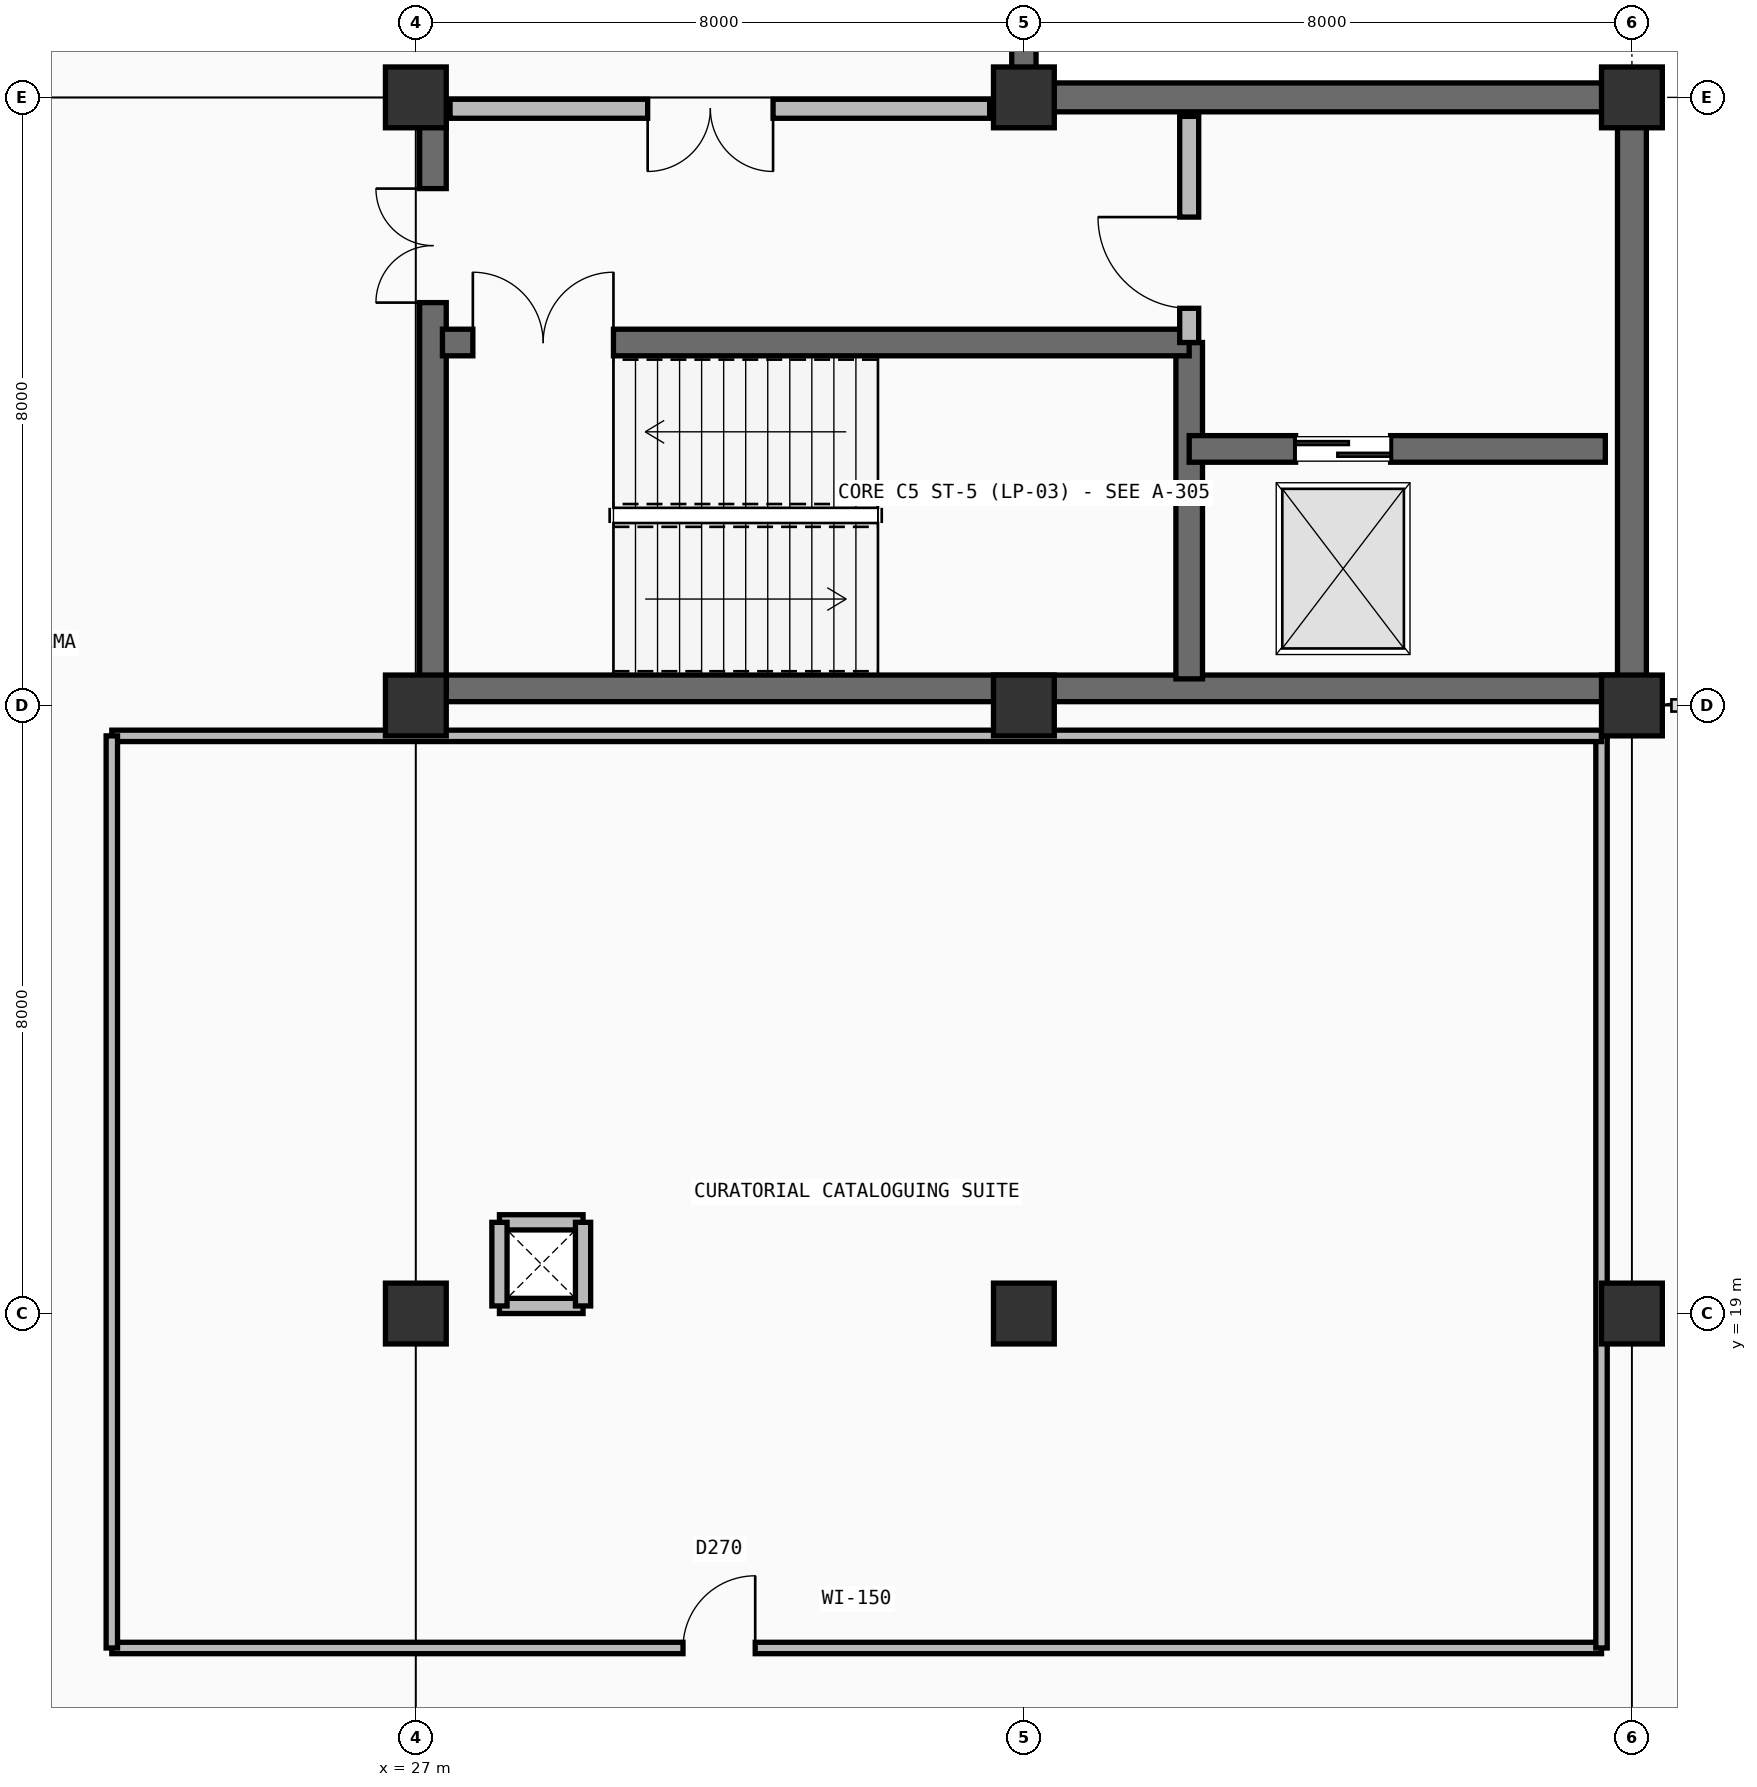
"""IFC4 building model, lengths in metres.
Left out: names, types, materials, properties, quantities, classifications, styles, units other than length and angle.
Written with IfcOpenShell. Run it as: python <this file> out.ifc"""

import sys

from ifc_helpers import new_model, si_unit, direction, frame, frame_2d, origin, origin_2d, place, context, subcontext, project, spatial, rectangle, extrude, element, fill, save


model = new_model("IFC4")
c1 = context("Model", 3, precision=1e-05, world=origin(), true_north=direction((0.0, 1.0)))
c2 = subcontext(c1, "Body", "Model", "MODEL_VIEW")
j1 = project(units=[si_unit("LENGTHUNIT", "METRE"), si_unit("PLANEANGLEUNIT", "RADIAN")], contexts=[c1])
p1 = place(None, origin())
s1 = spatial("IfcSite", under=j1, at=p1, CompositionType="ELEMENT")
p2 = place(p1, origin())
s2 = spatial("IfcBuilding", under=s1, at=p2, CompositionType="ELEMENT")
p3 = place(p2, frame((0.0, 0.0, 9.9)))
s3 = spatial("IfcBuildingStorey", under=s2, at=p3, CompositionType="ELEMENT", Elevation=9.9)
for number, where, z_axis, x_axis in (
    (1, (27.0, 19.0, 0.0), (0.0, 0.0, 1.0), (1.0, 0.0, 0.0)),
    (2, (27.0, 27.0, 0.0), (0.0, 0.0, 1.0), (1.0, 0.0, 0.0)),
    (3, (27.0, 35.0, 0.0), (0.0, 0.0, 1.0), (1.0, 0.0, 0.0)),
    (4, (35.0, 19.0, 0.0), (0.0, 0.0, 1.0), (1.0, 0.0, 0.0)),
    (5, (35.0, 27.0, 0.0), (0.0, 0.0, 1.0), (1.0, 0.0, 0.0)),
    (6, (35.0, 35.0, 0.0), (0.0, 0.0, 1.0), (1.0, 0.0, 0.0)),
    (7, (43.0, 19.0, 0.0), (0.0, 0.0, 1.0), (1.0, 0.0, 0.0)),
    (8, (43.0, 27.0, 0.0), (0.0, 0.0, 1.0), (1.0, 0.0, 0.0)),
    (9, (43.0, 35.0, 0.0), (0.0, 0.0, 1.0), (1.0, 0.0, 0.0)),
):
    element("IfcColumn", number, at=place(p3, frame(where, z_axis=z_axis, x_axis=x_axis)), inside=s3, PredefinedType="COLUMN", context=c2, shape_type="SweptSolid", body=[
        extrude(rectangle(XDim=0.8, YDim=0.8, at=origin_2d()), origin(), (0.0, 0.0, 1.0), 4.5),
    ])
p4 = place(p3, frame((35.0, 43.0, 0.0), z_axis=(0.0, 0.0, 1.0), x_axis=(0.0, -1.0, 0.0)))
e10 = element("IfcWall", 10, at=p4, inside=s3, PredefinedType="SOLIDWALL", context=c2, shape_type="SweptSolid", body=[
    extrude(rectangle(XDim=8.0, YDim=0.32, at=frame_2d((4.0, 0.0))), origin(), (0.0, 0.0, 1.0), 4.5),
])
p5 = place(p4, frame((2.95, 0.0, 1.1)))
e11 = element("IfcOpeningElement", 11, at=p5, cuts=e10, PredefinedType="OPENING", context=c2, shape_type="SweptSolid", body=[
    extrude(rectangle(XDim=2.1, YDim=0.95, at=frame_2d((1.05, 0.475))), frame((0.0, 0.17, 0.0), z_axis=(0.0, -1.0, 0.0), x_axis=(1.0, 0.0, 0.0)), (0.0, 0.0, 1.0), 0.34),
])
for number, where, z_axis, x_axis in (
    (12, (35.0, 35.0, 0.0), (0.0, 0.0, 1.0), (1.0, 0.0, 0.0)),
    (13, (43.0, 35.0, 0.0), (0.0, 0.0, 1.0), (0.0, -1.0, 0.0)),
):
    element("IfcWall", number, at=place(p3, frame(where, z_axis=z_axis, x_axis=x_axis)), inside=s3, PredefinedType="SOLIDWALL", context=c2, shape_type="SweptSolid", body=[
        extrude(rectangle(XDim=8.0, YDim=0.38, at=frame_2d((4.0, 0.0))), origin(), (0.0, 0.0, 1.0), 4.5),
    ])
p6 = place(p3, frame((27.2, 27.225, 0.0), z_axis=(0.0, 0.0, 1.0), x_axis=(1.0, 0.0, 0.0)))
e14 = element("IfcWall", 14, at=p6, inside=s3, PredefinedType="SHEAR", context=c2, shape_type="SweptSolid", body=[
    extrude(rectangle(XDim=15.6, YDim=0.35, at=frame_2d((7.8, 0.0))), origin(), (0.0, 0.0, 1.0), 4.2),
])
p7 = place(p3, frame((27.225, 27.2, 0.0), z_axis=(0.0, 0.0, 1.0), x_axis=(0.0, 1.0, 0.0)))
e15 = element("IfcWall", 15, at=p7, inside=s3, PredefinedType="SHEAR", context=c2, shape_type="SweptSolid", body=[
    extrude(rectangle(XDim=7.6, YDim=0.35, at=frame_2d((3.8, 0.0))), origin(), (0.0, 0.0, 1.0), 4.2),
])
p8 = place(p7, frame((5.1, 0.0, 0.0)))
e16 = element("IfcOpeningElement", 16, at=p8, cuts=e15, PredefinedType="OPENING", context=c2, shape_type="SweptSolid", body=[
    extrude(rectangle(XDim=1.5, YDim=2.2, at=frame_2d((0.75, 1.1))), frame((0.0, 0.185, 0.0), z_axis=(0.0, -1.0, 0.0), x_axis=(1.0, 0.0, 0.0)), (0.0, 0.0, 1.0), 0.37),
])
p9 = place(p3, frame((37.175, 27.35, 0.0), z_axis=(0.0, 0.0, 1.0), x_axis=(0.0, 1.0, 0.0)))
e17 = element("IfcWall", 17, at=p9, inside=s3, PredefinedType="SHEAR", context=c2, shape_type="SweptSolid", body=[
    extrude(rectangle(XDim=4.425, YDim=0.35, at=frame_2d((2.212, 0.0))), origin(), (0.0, 0.0, 1.0), 4.2),
])
p10 = place(p3, frame((27.35, 31.775, 0.0), z_axis=(0.0, 0.0, 1.0), x_axis=(1.0, 0.0, 0.0)))
e18 = element("IfcWall", 18, at=p10, inside=s3, PredefinedType="SHEAR", context=c2, shape_type="SweptSolid", body=[
    extrude(rectangle(XDim=9.825, YDim=0.35, at=frame_2d((4.913, 0.0))), origin(), (0.0, 0.0, 1.0), 4.2),
])
p11 = place(p10, frame((0.4, 0.0, 0.0)))
e19 = element("IfcOpeningElement", 19, at=p11, cuts=e18, PredefinedType="OPENING", context=c2, shape_type="SweptSolid", body=[
    extrude(rectangle(XDim=1.85, YDim=2.25, at=frame_2d((0.925, 1.125))), frame((0.0, 0.185, 0.0), z_axis=(0.0, -1.0, 0.0), x_axis=(1.0, 0.0, 0.0)), (0.0, 0.0, 1.0), 0.37),
])
p12 = place(p3, frame((37.175, 30.375, 0.0), z_axis=(0.0, 0.0, 1.0), x_axis=(1.0, 0.0, 0.0)))
e20 = element("IfcWall", 20, at=p12, inside=s3, PredefinedType="SHEAR", context=c2, shape_type="SweptSolid", body=[
    extrude(rectangle(XDim=5.475, YDim=0.35, at=frame_2d((2.737, 0.0))), origin(), (0.0, 0.0, 1.0), 4.2),
])
p13 = place(p12, frame((1.4, 0.0, 0.0)))
e21 = element("IfcOpeningElement", 21, at=p13, cuts=e20, PredefinedType="OPENING", context=c2, shape_type="SweptSolid", body=[
    extrude(rectangle(XDim=1.25, YDim=2.25, at=frame_2d((0.625, 1.125))), frame((0.0, 0.185, 0.0), z_axis=(0.0, -1.0, 0.0), x_axis=(1.0, 0.0, 0.0)), (0.0, 0.0, 1.0), 0.37),
])
p14 = place(p3, frame((37.175, 31.775, 0.0), z_axis=(0.0, 0.0, 1.0), x_axis=(0.0, 1.0, 0.0)))
e22 = element("IfcWall", 22, at=p14, inside=s3, PredefinedType="PARTITIONING", context=c2, shape_type="SweptSolid", body=[
    extrude(rectangle(XDim=2.975, YDim=0.25, at=frame_2d((1.488, 0.0))), origin(), (0.0, 0.0, 1.0), 4.2),
])
p15 = place(p14, frame((0.45, 0.0, 0.0)))
e23 = element("IfcOpeningElement", 23, at=p15, cuts=e22, PredefinedType="OPENING", context=c2, shape_type="SweptSolid", body=[
    extrude(rectangle(XDim=1.2, YDim=2.2, at=frame_2d((0.6, 1.1))), frame((0.0, 0.135, 0.0), z_axis=(0.0, -1.0, 0.0), x_axis=(1.0, 0.0, 0.0)), (0.0, 0.0, 1.0), 0.27),
])
p16 = place(p3, frame((27.45, 34.85, 0.0), z_axis=(0.0, 0.0, 1.0), x_axis=(1.0, 0.0, 0.0)))
e24 = element("IfcWall", 24, at=p16, inside=s3, PredefinedType="PARTITIONING", context=c2, shape_type="SweptSolid", body=[
    extrude(rectangle(XDim=7.1, YDim=0.25, at=frame_2d((3.55, 0.0))), origin(), (0.0, 0.0, 1.0), 3.535),
])
p17 = place(p16, frame((2.6, 0.0, 0.0)))
e25 = element("IfcOpeningElement", 25, at=p17, cuts=e24, PredefinedType="OPENING", context=c2, shape_type="SweptSolid", body=[
    extrude(rectangle(XDim=1.65, YDim=2.25, at=frame_2d((0.825, 1.125))), frame((0.0, 0.135, 0.0), z_axis=(0.0, -1.0, 0.0), x_axis=(1.0, 0.0, 0.0)), (0.0, 0.0, 1.0), 0.27),
])
p18 = place(p3, frame((23.0, 14.6, 0.0), z_axis=(0.0, 0.0, 1.0), x_axis=(1.0, 0.0, 0.0)))
e26 = element("IfcWall", 26, at=p18, inside=s3, PredefinedType="PARTITIONING", context=c2, shape_type="SweptSolid", body=[
    extrude(rectangle(XDim=19.6, YDim=0.15, at=frame_2d((9.8, 0.0))), origin(), (0.0, 0.0, 1.0), 4.2),
])
p19 = place(p18, frame((7.515, 0.0, 0.0)))
e27 = element("IfcOpeningElement", 27, at=p19, cuts=e26, PredefinedType="OPENING", context=c2, shape_type="SweptSolid", body=[
    extrude(rectangle(XDim=0.95, YDim=2.12, at=frame_2d((0.475, 1.06))), frame((0.0, 0.085, 0.0), z_axis=(0.0, -1.0, 0.0), x_axis=(1.0, 0.0, 0.0)), (0.0, 0.0, 1.0), 0.17),
])
p20 = place(p3, frame((42.6, 14.6, 0.0), z_axis=(0.0, 0.0, 1.0), x_axis=(0.0, 1.0, 0.0)))
e28 = element("IfcWall", 28, at=p20, inside=s3, PredefinedType="PARTITIONING", context=c2, shape_type="SweptSolid", body=[
    extrude(rectangle(XDim=12.0, YDim=0.15, at=frame_2d((6.0, 0.0))), origin(), (0.0, 0.0, 1.0), 3.585),
])
p21 = place(p3, frame((23.0, 26.6, 0.0), z_axis=(0.0, 0.0, 1.0), x_axis=(1.0, 0.0, 0.0)))
e29 = element("IfcWall", 29, at=p21, inside=s3, PredefinedType="PARTITIONING", context=c2, shape_type="SweptSolid", body=[
    extrude(rectangle(XDim=19.6, YDim=0.15, at=frame_2d((9.8, 0.0))), origin(), (0.0, 0.0, 1.0), 3.535),
])
p22 = place(p3, frame((23.0, 14.6, 0.0), z_axis=(0.0, 0.0, 1.0), x_axis=(0.0, 1.0, 0.0)))
e30 = element("IfcWall", 30, at=p22, inside=s3, PredefinedType="PARTITIONING", context=c2, shape_type="SweptSolid", body=[
    extrude(rectangle(XDim=12.0, YDim=0.15, at=frame_2d((6.0, 0.0))), origin(), (0.0, 0.0, 1.0), 3.635),
])
p23 = place(p3, frame((28.1, 19.1, 0.0), z_axis=(0.0, 0.0, 1.0), x_axis=(1.0, 0.0, 0.0)))
e31 = element("IfcWall", 31, at=p23, inside=s3, PredefinedType="PARTITIONING", context=c2, shape_type="SweptSolid", body=[
    extrude(rectangle(XDim=1.1, YDim=0.2, at=frame_2d((0.55, 0.0))), origin(), (0.0, 0.0, 1.0), 3.535),
])
for number, where, z_axis, x_axis in (
    (32, (28.1, 20.2, 0.0), (0.0, 0.0, 1.0), (1.0, 0.0, 0.0)),
    (33, (28.1, 19.1, 0.0), (0.0, 0.0, 1.0), (0.0, 1.0, 0.0)),
    (34, (29.2, 19.1, 0.0), (0.0, 0.0, 1.0), (0.0, 1.0, 0.0)),
):
    element("IfcWall", number, at=place(p3, frame(where, z_axis=z_axis, x_axis=x_axis)), inside=s3, PredefinedType="PARTITIONING", context=c2, shape_type="SweptSolid", body=[
        extrude(rectangle(XDim=1.1, YDim=0.2, at=frame_2d((0.55, 0.0))), origin(), (0.0, 0.0, 1.0), 4.2),
    ])
p24 = place(p11, origin())
e35 = element("IfcDoor", 35, at=p24, inside=s3, OperationType="DOUBLE_DOOR_SINGLE_SWING", PredefinedType="DOOR", context=c2, shape_type="SweptSolid", body=[
    extrude(rectangle(XDim=1.85, YDim=2.25, at=frame_2d((0.925, 1.125))), frame((0.0, 0.025, 0.0), z_axis=(0.0, -1.0, 0.0), x_axis=(1.0, 0.0, 0.0)), (0.0, 0.0, 1.0), 0.05),
])
fill(e19, e35)
p25 = place(p13, origin())
e36 = element("IfcDoor", 36, at=p25, inside=s3, OperationType="DOUBLE_DOOR_SLIDING", PredefinedType="DOOR", context=c2, shape_type="SweptSolid", body=[
    extrude(rectangle(XDim=1.25, YDim=2.25, at=frame_2d((0.625, 1.125))), frame((0.0, 0.025, 0.0), z_axis=(0.0, -1.0, 0.0), x_axis=(1.0, 0.0, 0.0)), (0.0, 0.0, 1.0), 0.05),
])
fill(e21, e36)
p26 = place(p15, origin())
e37 = element("IfcDoor", 37, at=p26, inside=s3, OperationType="SINGLE_SWING_RIGHT", PredefinedType="DOOR", context=c2, shape_type="SweptSolid", body=[
    extrude(rectangle(XDim=1.2, YDim=2.2, at=frame_2d((0.6, 1.1))), frame((0.0, 0.025, 0.0), z_axis=(0.0, -1.0, 0.0), x_axis=(1.0, 0.0, 0.0)), (0.0, 0.0, 1.0), 0.05),
])
fill(e23, e37)
p27 = place(p17, frame((1.65, 0.0, 0.0), z_axis=(0.0, 0.0, 1.0), x_axis=(-1.0, 0.0, 0.0)))
e38 = element("IfcDoor", 38, at=p27, inside=s3, OperationType="DOUBLE_DOOR_SINGLE_SWING", PredefinedType="DOOR", context=c2, shape_type="SweptSolid", body=[
    extrude(rectangle(XDim=1.65, YDim=2.25, at=frame_2d((0.825, 1.125))), frame((0.0, 0.025, 0.0), z_axis=(0.0, -1.0, 0.0), x_axis=(1.0, 0.0, 0.0)), (0.0, 0.0, 1.0), 0.05),
])
fill(e25, e38)
p28 = place(p8, origin())
e39 = element("IfcDoor", 39, at=p28, inside=s3, OperationType="DOUBLE_DOOR_SINGLE_SWING", PredefinedType="DOOR", context=c2, shape_type="SweptSolid", body=[
    extrude(rectangle(XDim=1.5, YDim=2.2, at=frame_2d((0.75, 1.1))), frame((0.0, 0.025, 0.0), z_axis=(0.0, -1.0, 0.0), x_axis=(1.0, 0.0, 0.0)), (0.0, 0.0, 1.0), 0.05),
])
fill(e16, e39)
p29 = place(p19, origin())
e40 = element("IfcDoor", 40, at=p29, inside=s3, OperationType="SINGLE_SWING_RIGHT", PredefinedType="DOOR", context=c2, shape_type="SweptSolid", body=[
    extrude(rectangle(XDim=0.95, YDim=2.12, at=frame_2d((0.475, 1.06))), frame((0.0, 0.025, 0.0), z_axis=(0.0, -1.0, 0.0), x_axis=(1.0, 0.0, 0.0)), (0.0, 0.0, 1.0), 0.05),
])
fill(e27, e40)
save(model, sys.argv[1])
